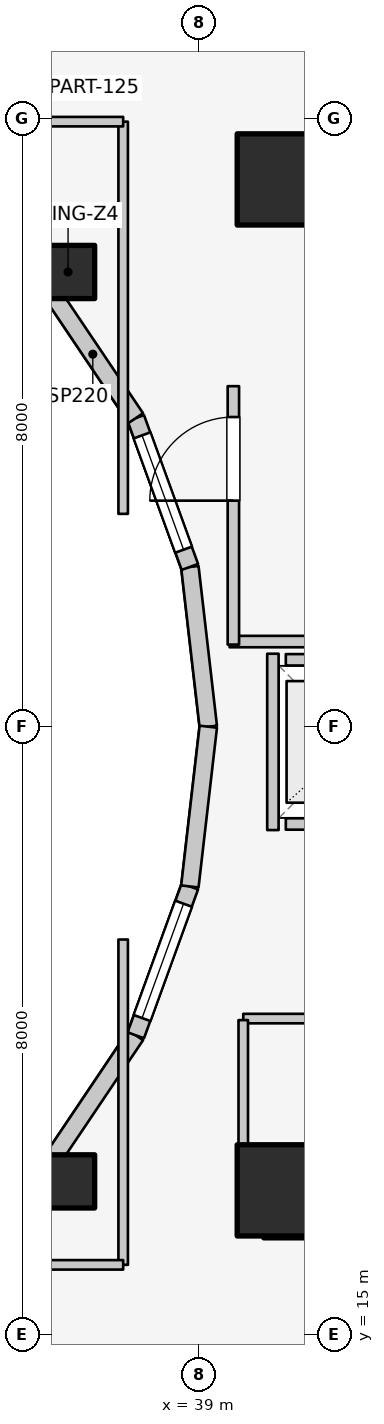
"""IFC4 building model, lengths in metres.
Left out: names, types, materials, properties, quantities, classifications, styles, units other than length and angle.
Written with IfcOpenShell. Run it as: python <this file> out.ifc"""

import sys

from ifc_helpers import new_model, si_unit, direction, frame, frame_2d, origin, origin_2d, place, context, subcontext, project, spatial, rectangle, extrude, element, fill, save


model = new_model("IFC4")
c1 = context("Model", 3, precision=1e-05, world=origin(), true_north=direction((0.0, 1.0)))
c2 = subcontext(c1, "Body", "Model", "MODEL_VIEW")
j1 = project(units=[si_unit("LENGTHUNIT", "METRE"), si_unit("PLANEANGLEUNIT", "RADIAN")], contexts=[c1])
p1 = place(None, origin())
s1 = spatial("IfcSite", under=j1, at=p1, CompositionType="ELEMENT")
p2 = place(p1, origin())
s2 = spatial("IfcBuilding", under=s1, at=p2, CompositionType="ELEMENT")
p3 = place(p2, frame((0.0, 0.0, 229.5)))
s3 = spatial("IfcBuildingStorey", under=s2, at=p3, CompositionType="ELEMENT", Elevation=229.5)
for number, where, z_axis, x_axis in (
    (1, (39.85, 16.55, 0.0), (0.0, 0.0, 1.0), (1.0, 0.0, 0.0)),
    (2, (39.85, 30.35, 0.0), (0.0, 0.0, 1.0), (1.0, 0.0, 0.0)),
):
    element("IfcWall", number, at=place(p3, frame(where, z_axis=z_axis, x_axis=x_axis)), inside=s3, PredefinedType="SHEAR", context=c2, shape_type="SweptSolid", body=[
        extrude(rectangle(XDim=4.5, YDim=0.55, at=frame_2d((2.25, 0.0))), origin(), (0.0, 0.0, 1.0), 3.1),
    ])
for number, where, z_axis, x_axis in (
    (3, (40.1, 16.9, 0.0), (0.0, 0.0, 1.0), (1.0, 0.0, 0.0)),
    (4, (40.1, 30.2, 0.0), (0.0, 0.0, 1.0), (1.0, 0.0, 0.0)),
):
    element("IfcColumn", number, at=place(p3, frame(where, z_axis=z_axis, x_axis=x_axis)), inside=s3, PredefinedType="COLUMN", context=c2, shape_type="SweptSolid", body=[
        extrude(rectangle(XDim=1.2, YDim=1.2, at=origin_2d()), origin(), (0.0, 0.0, 1.0), 3.1),
    ])
for number, where, z_axis, x_axis in (
    (5, (37.275, 28.982, 0.0), (0.0, 0.0, 1.0), (1.0, 0.0, 0.0)),
    (6, (37.275, 17.018, 0.0), (0.0, 0.0, 1.0), (1.0, 0.0, 0.0)),
):
    element("IfcColumn", number, at=place(p3, frame(where, z_axis=z_axis, x_axis=x_axis)), inside=s3, PredefinedType="COLUMN", context=c2, shape_type="SweptSolid", body=[
        extrude(rectangle(XDim=0.7, YDim=0.7, at=origin_2d()), origin(), (0.0, 0.0, 1.0), 3.1),
    ])
p4 = place(p3, frame((39.12, 23.0, 0.0), z_axis=(0.0, 0.0, 1.0), x_axis=(-0.114711713601, 0.993398823617, 0.0)))
e7 = element("IfcWall", 7, at=p4, inside=s3, PredefinedType="STANDARD", context=c2, shape_type="SweptSolid", body=[
    extrude(rectangle(XDim=2.115, YDim=0.23, at=frame_2d((1.058, 0.0))), origin(), (0.0, 0.0, 1.0), 2.84),
])
p5 = place(p3, frame((38.877, 25.102, 0.0), z_axis=(0.0, 0.0, 1.0), x_axis=(-0.341423187295, 0.93990968033, 0.0)))
e8 = element("IfcWall", 8, at=p5, inside=s3, PredefinedType="STANDARD", context=c2, shape_type="SweptSolid", body=[
    extrude(rectangle(XDim=2.084, YDim=0.23, at=frame_2d((1.042, 0.0))), origin(), (0.0, 0.0, 1.0), 2.84),
])
p6 = place(p5, frame((0.242, 0.0, 0.85)))
e9 = element("IfcOpeningElement", 9, at=p6, cuts=e8, PredefinedType="OPENING", context=c2, shape_type="SweptSolid", body=[
    extrude(rectangle(XDim=1.6, YDim=1.65, at=frame_2d((0.8, 0.825))), frame((0.0, 0.125, 0.0), z_axis=(0.0, -1.0, 0.0), x_axis=(1.0, 0.0, 0.0)), (0.0, 0.0, 1.0), 0.25),
])
p7 = place(p3, frame((38.166, 27.06, 0.0), z_axis=(0.0, 0.0, 1.0), x_axis=(-0.558197800898, 0.829707909492, 0.0)))
e10 = element("IfcWall", 10, at=p7, inside=s3, PredefinedType="STANDARD", context=c2, shape_type="SweptSolid", body=[
    extrude(rectangle(XDim=2.027, YDim=0.23, at=frame_2d((1.013, 0.0))), origin(), (0.0, 0.0, 1.0), 2.16),
])
for number, where, z_axis, x_axis in (
    (11, (37.035, 28.742, 0.0), (0.0, 0.0, 1.0), (-0.753, 0.659, 0.0)),
    (12, (35.56, 15.968, 0.0), (0.0, 0.0, 1.0), (0.753, 0.659, 0.0)),
):
    element("IfcWall", number, at=place(p3, frame(where, z_axis=z_axis, x_axis=x_axis)), inside=s3, PredefinedType="STANDARD", context=c2, shape_type="SweptSolid", body=[
        extrude(rectangle(XDim=1.959, YDim=0.23, at=frame_2d((0.98, 0.0))), origin(), (0.0, 0.0, 1.0), 2.16),
    ])
p8 = place(p3, frame((37.035, 17.258, 0.0), z_axis=(0.0, 0.0, 1.0), x_axis=(0.558197800898, 0.829707909492, 0.0)))
e13 = element("IfcWall", 13, at=p8, inside=s3, PredefinedType="STANDARD", context=c2, shape_type="SweptSolid", body=[
    extrude(rectangle(XDim=2.027, YDim=0.23, at=frame_2d((1.013, 0.0))), origin(), (0.0, 0.0, 1.0), 2.16),
])
p9 = place(p3, frame((38.166, 18.94, 0.0), z_axis=(0.0, 0.0, 1.0), x_axis=(0.341423187295, 0.93990968033, 0.0)))
e14 = element("IfcWall", 14, at=p9, inside=s3, PredefinedType="STANDARD", context=c2, shape_type="SweptSolid", body=[
    extrude(rectangle(XDim=2.084, YDim=0.23, at=frame_2d((1.042, 0.0))), origin(), (0.0, 0.0, 1.0), 2.84),
])
p10 = place(p9, frame((0.242, 0.0, 0.85)))
e15 = element("IfcOpeningElement", 15, at=p10, cuts=e14, PredefinedType="OPENING", context=c2, shape_type="SweptSolid", body=[
    extrude(rectangle(XDim=1.6, YDim=1.65, at=frame_2d((0.8, 0.825))), frame((0.0, 0.125, 0.0), z_axis=(0.0, -1.0, 0.0), x_axis=(1.0, 0.0, 0.0)), (0.0, 0.0, 1.0), 0.25),
])
p11 = place(p3, frame((38.877, 20.898, 0.0), z_axis=(0.0, 0.0, 1.0), x_axis=(0.114711713601, 0.993398823617, 0.0)))
e16 = element("IfcWall", 16, at=p11, inside=s3, PredefinedType="STANDARD", context=c2, shape_type="SweptSolid", body=[
    extrude(rectangle(XDim=2.115, YDim=0.23, at=frame_2d((1.058, 0.0))), origin(), (0.0, 0.0, 1.0), 2.84),
])
p12 = place(p3, frame((40.14, 21.72, 0.0), z_axis=(0.0, 0.0, 1.0), x_axis=(1.0, 0.0, 0.0)))
e17 = element("IfcWall", 17, at=p12, inside=s3, PredefinedType="SOLIDWALL", context=c2, shape_type="SweptSolid", body=[
    extrude(rectangle(XDim=1.82, YDim=0.15, at=frame_2d((0.91, 0.0))), origin(), (0.0, 0.0, 1.0), 2.12),
])
p13 = place(p12, frame((0.36, 0.0, 0.0)))
e18 = element("IfcOpeningElement", 18, at=p13, cuts=e17, PredefinedType="OPENING", context=c2, shape_type="SweptSolid", body=[
    extrude(rectangle(XDim=1.1, YDim=2.1, at=frame_2d((0.55, 1.05))), frame((0.0, 0.085, 0.0), z_axis=(0.0, -1.0, 0.0), x_axis=(1.0, 0.0, 0.0)), (0.0, 0.0, 1.0), 0.17),
])
p14 = place(p3, frame((40.14, 23.88, 0.0), z_axis=(0.0, 0.0, 1.0), x_axis=(1.0, 0.0, 0.0)))
e19 = element("IfcWall", 19, at=p14, inside=s3, PredefinedType="SOLIDWALL", context=c2, shape_type="SweptSolid", body=[
    extrude(rectangle(XDim=1.82, YDim=0.15, at=frame_2d((0.91, 0.0))), origin(), (0.0, 0.0, 1.0), 2.12),
])
p15 = place(p3, frame((39.97, 21.64, 0.0), z_axis=(0.0, 0.0, 1.0), x_axis=(0.0, 1.0, 0.0)))
e20 = element("IfcWall", 20, at=p15, inside=s3, PredefinedType="SOLIDWALL", context=c2, shape_type="SweptSolid", body=[
    extrude(rectangle(XDim=2.32, YDim=0.15, at=frame_2d((1.16, 0.0))), origin(), (0.0, 0.0, 1.0), 2.12),
])
p16 = place(p3, frame((39.4, 24.12, 0.0), z_axis=(0.0, 0.0, 1.0), x_axis=(1.0, 0.0, 0.0)))
e21 = element("IfcWall", 21, at=p16, inside=s3, PredefinedType="PARTITIONING", context=c2, shape_type="SweptSolid", body=[
    extrude(rectangle(XDim=5.08, YDim=0.15, at=frame_2d((2.54, 0.0))), origin(), (0.0, 0.0, 1.0), 2.12),
])
p17 = place(p3, frame((39.45, 24.08, 0.0), z_axis=(0.0, 0.0, 1.0), x_axis=(0.0, 1.0, 0.0)))
e22 = element("IfcWall", 22, at=p17, inside=s3, PredefinedType="PARTITIONING", context=c2, shape_type="SweptSolid", body=[
    extrude(rectangle(XDim=3.4, YDim=0.15, at=frame_2d((1.7, 0.0))), origin(), (0.0, 0.0, 1.0), 2.855),
])
p18 = place(p17, frame((1.894, 0.0, 0.0)))
e23 = element("IfcOpeningElement", 23, at=p18, cuts=e22, PredefinedType="OPENING", context=c2, shape_type="SweptSolid", body=[
    extrude(rectangle(XDim=1.1, YDim=2.1, at=frame_2d((0.55, 1.05))), frame((0.0, 0.085, 0.0), z_axis=(0.0, -1.0, 0.0), x_axis=(1.0, 0.0, 0.0)), (0.0, 0.0, 1.0), 0.17),
])
p19 = place(p3, frame((39.58, 19.16, 0.0), z_axis=(0.0, 0.0, 1.0), x_axis=(1.0, 0.0, 0.0)))
e24 = element("IfcWall", 24, at=p19, inside=s3, PredefinedType="PARTITIONING", context=c2, shape_type="SweptSolid", body=[
    extrude(rectangle(XDim=4.87, YDim=0.125, at=frame_2d((2.435, 0.0))), origin(), (0.0, 0.0, 1.0), 2.12),
])
p20 = place(p19, frame((1.748, 0.0, 0.0)))
e25 = element("IfcOpeningElement", 25, at=p20, cuts=e24, PredefinedType="OPENING", context=c2, shape_type="SweptSolid", body=[
    extrude(rectangle(XDim=0.85, YDim=2.05, at=frame_2d((0.425, 1.025))), frame((0.0, 0.073, 0.0), z_axis=(0.0, -1.0, 0.0), x_axis=(1.0, 0.0, 0.0)), (0.0, 0.0, 1.0), 0.145),
])
p21 = place(p3, frame((39.58, 17.1, 0.0), z_axis=(0.0, 0.0, 1.0), x_axis=(0.0, 1.0, 0.0)))
e26 = element("IfcWall", 26, at=p21, inside=s3, PredefinedType="PARTITIONING", context=c2, shape_type="SweptSolid", body=[
    extrude(rectangle(XDim=2.04, YDim=0.125, at=frame_2d((1.02, 0.0))), origin(), (0.0, 0.0, 1.0), 2.232),
])
p22 = place(p3, frame((35.55, 30.015, 0.0), z_axis=(0.0, 0.0, 1.0), x_axis=(0.522763432117, 0.852477796802, 0.0)))
e27 = element("IfcWall", 27, at=p22, inside=s3, PredefinedType="PARTITIONING", context=c2, shape_type="SweptSolid", body=[
    extrude(rectangle(XDim=3.269, YDim=0.125, at=frame_2d((1.635, 0.0))), origin(), (0.0, 0.0, 1.0), 2.376),
])
p23 = place(p3, frame((35.55, 15.985, 0.0), z_axis=(0.0, 0.0, 1.0), x_axis=(0.52592395012, -0.850531597702, 0.0)))
e28 = element("IfcWall", 28, at=p23, inside=s3, PredefinedType="PARTITIONING", context=c2, shape_type="SweptSolid", body=[
    extrude(rectangle(XDim=2.869, YDim=0.125, at=frame_2d((1.435, 0.0))), origin(), (0.0, 0.0, 1.0), 2.376),
])
p24 = place(p3, frame((38.0, 25.8, 0.0), z_axis=(0.0, 0.0, 1.0), x_axis=(0.0, 1.0, 0.0)))
e29 = element("IfcWall", 29, at=p24, inside=s3, PredefinedType="PARTITIONING", context=c2, shape_type="SweptSolid", body=[
    extrude(rectangle(XDim=5.16, YDim=0.125, at=frame_2d((2.58, 0.0))), origin(), (0.0, 0.0, 1.0), 2.232),
])
p25 = place(p3, frame((35.4, 30.96, 0.0), z_axis=(0.0, 0.0, 1.0), x_axis=(1.0, 0.0, 0.0)))
e30 = element("IfcWall", 30, at=p25, inside=s3, PredefinedType="PARTITIONING", context=c2, shape_type="SweptSolid", body=[
    extrude(rectangle(XDim=2.6, YDim=0.125, at=frame_2d((1.3, 0.0))), origin(), (0.0, 0.0, 1.0), 2.376),
])
p26 = place(p3, frame((38.0, 15.92, 0.0), z_axis=(0.0, 0.0, 1.0), x_axis=(0.0, 1.0, 0.0)))
e31 = element("IfcWall", 31, at=p26, inside=s3, PredefinedType="PARTITIONING", context=c2, shape_type="SweptSolid", body=[
    extrude(rectangle(XDim=4.28, YDim=0.125, at=frame_2d((2.14, 0.0))), origin(), (0.0, 0.0, 1.0), 2.232),
])
p27 = place(p3, frame((35.4, 15.92, 0.0), z_axis=(0.0, 0.0, 1.0), x_axis=(1.0, 0.0, 0.0)))
e32 = element("IfcWall", 32, at=p27, inside=s3, PredefinedType="PARTITIONING", context=c2, shape_type="SweptSolid", body=[
    extrude(rectangle(XDim=2.6, YDim=0.125, at=frame_2d((1.3, 0.0))), origin(), (0.0, 0.0, 1.0), 2.232),
])
p28 = place(p6, origin())
e33 = element("IfcWindow", 33, at=p28, inside=s3, PartitioningType="SINGLE_PANEL", PredefinedType="WINDOW", context=c2, shape_type="SweptSolid", body=[
    extrude(rectangle(XDim=1.6, YDim=1.65, at=frame_2d((0.8, 0.825))), frame((0.0, 0.03, 0.0), z_axis=(0.0, -1.0, 0.0), x_axis=(1.0, 0.0, 0.0)), (0.0, 0.0, 1.0), 0.06),
])
fill(e9, e33)
p29 = place(p10, origin())
e34 = element("IfcWindow", 34, at=p29, inside=s3, PartitioningType="SINGLE_PANEL", PredefinedType="WINDOW", context=c2, shape_type="SweptSolid", body=[
    extrude(rectangle(XDim=1.6, YDim=1.65, at=frame_2d((0.8, 0.825))), frame((0.0, 0.03, 0.0), z_axis=(0.0, -1.0, 0.0), x_axis=(1.0, 0.0, 0.0)), (0.0, 0.0, 1.0), 0.06),
])
fill(e15, e34)
p30 = place(p18, origin())
e35 = element("IfcDoor", 35, at=p30, inside=s3, OperationType="SINGLE_SWING_LEFT", PredefinedType="DOOR", context=c2, shape_type="SweptSolid", body=[
    extrude(rectangle(XDim=1.1, YDim=2.1, at=frame_2d((0.55, 1.05))), frame((0.0, 0.025, 0.0), z_axis=(0.0, -1.0, 0.0), x_axis=(1.0, 0.0, 0.0)), (0.0, 0.0, 1.0), 0.05),
])
fill(e23, e35)
save(model, sys.argv[1])
